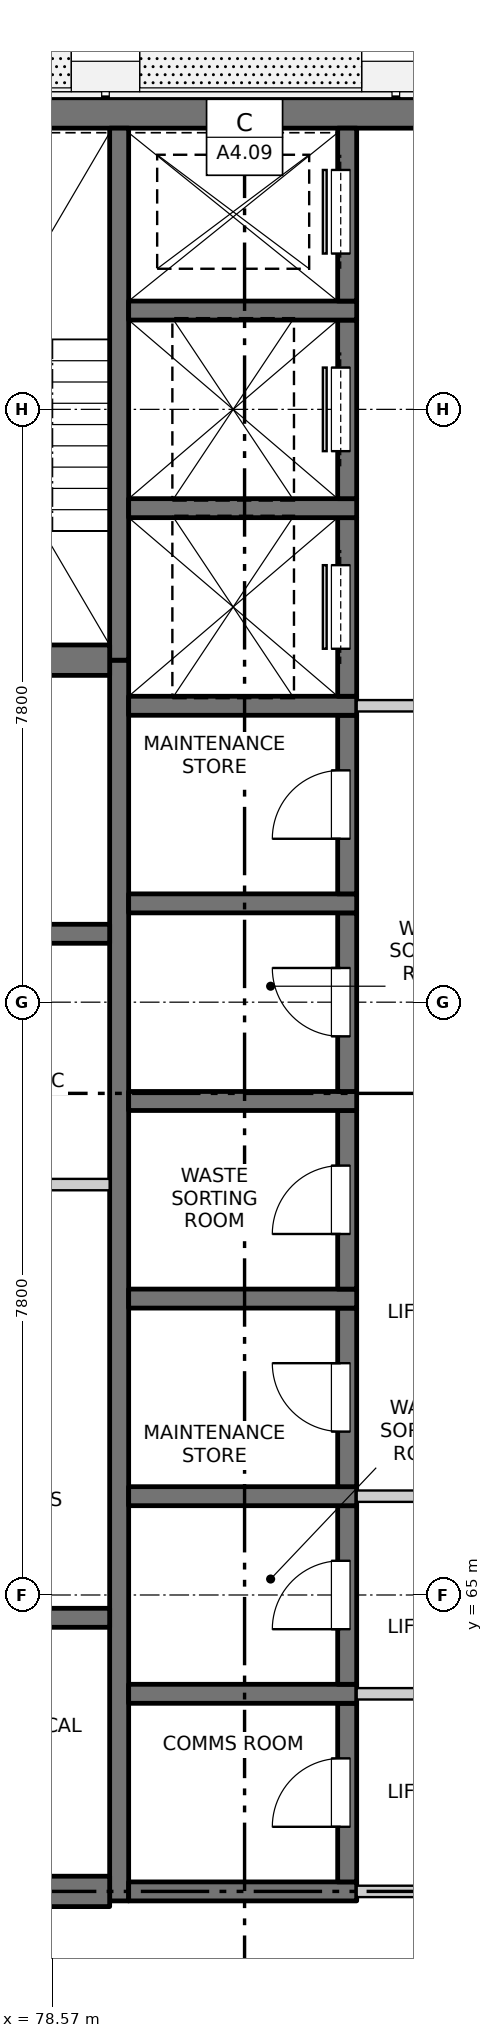
"""IFC4 building model, lengths in metres.
Left out: names, types, materials, properties, quantities, classifications, styles, units other than length and angle.
Written with IfcOpenShell. Run it as: python <this file> out.ifc"""

import sys

from ifc_helpers import new_model, si_unit, direction, frame, frame_2d, origin, place, context, subcontext, project, spatial, rectangle, extrude, element, fill, save


model = new_model("IFC4")
c1 = context("Model", 3, precision=1e-05, world=origin(), true_north=direction((0.0, 1.0)))
c2 = subcontext(c1, "Body", "Model", "MODEL_VIEW")
j1 = project(units=[si_unit("LENGTHUNIT", "METRE"), si_unit("PLANEANGLEUNIT", "RADIAN")], contexts=[c1])
p1 = place(None, origin())
s1 = spatial("IfcSite", under=j1, at=p1, CompositionType="ELEMENT")
p2 = place(p1, origin())
s2 = spatial("IfcBuilding", under=s1, at=p2, CompositionType="ELEMENT")
p3 = place(p2, frame((0.0, 0.0, 263.0)))
s3 = spatial("IfcBuildingStorey", under=s2, at=p3, CompositionType="ELEMENT", Elevation=263.0)
p4 = place(p3, frame((75.45, 84.5, -0.25), z_axis=(0.0, 0.0, 1.0), x_axis=(1.0, 0.0, 0.0)))
e1 = element("IfcWall", 1, at=p4, inside=s3, PredefinedType="SOLIDWALL", context=c2, shape_type="SweptSolid", body=[
    extrude(rectangle(XDim=19.1, YDim=0.4, at=frame_2d((9.55, 0.0))), origin(), (0.0, 0.0, 1.0), 3.35),
])
p5 = place(p3, frame((79.45, 60.975, -0.25), z_axis=(0.0, 0.0, 1.0), x_axis=(0.0, 1.0, 0.0)))
e2 = element("IfcWall", 2, at=p5, inside=s3, PredefinedType="SOLIDWALL", context=c2, shape_type="SweptSolid", body=[
    extrude(rectangle(XDim=16.325, YDim=0.25, at=frame_2d((8.163, 0.0))), origin(), (0.0, 0.0, 1.0), 3.35),
])
p6 = place(p3, frame((79.45, 77.3, -0.25), z_axis=(0.0, 0.0, 1.0), x_axis=(0.0, 1.0, 0.0)))
e3 = element("IfcWall", 3, at=p6, inside=s3, PredefinedType="SOLIDWALL", context=c2, shape_type="SweptSolid", body=[
    extrude(rectangle(XDim=7.0, YDim=0.25, at=frame_2d((3.5, 0.0))), origin(), (0.0, 0.0, 1.0), 3.35),
])
p7 = place(p3, frame((79.575, 61.1, -0.25), z_axis=(0.0, 0.0, 1.0), x_axis=(1.0, 0.0, 0.0)))
e4 = element("IfcWall", 4, at=p7, inside=s3, PredefinedType="SOLIDWALL", context=c2, shape_type="SweptSolid", body=[
    extrude(rectangle(XDim=3.0, YDim=0.25, at=frame_2d((1.5, 0.0))), origin(), (0.0, 0.0, 1.0), 3.35),
])
p8 = place(p3, frame((82.45, 61.225, -0.25), z_axis=(0.0, 0.0, 1.0), x_axis=(0.0, 1.0, 0.0)))
e5 = element("IfcWall", 5, at=p8, inside=s3, PredefinedType="SOLIDWALL", context=c2, shape_type="SweptSolid", body=[
    extrude(rectangle(XDim=2.35, YDim=0.25, at=frame_2d((1.175, 0.0))), origin(), (0.0, 0.0, 1.0), 3.35),
])
p9 = place(p8, frame((0.725, 0.0, 0.25)))
e6 = element("IfcOpeningElement", 6, at=p9, cuts=e5, PredefinedType="OPENING", context=c2, shape_type="SweptSolid", body=[
    extrude(rectangle(XDim=0.9, YDim=2.1, at=frame_2d((0.45, 1.05))), frame((0.0, 0.135, 0.0), z_axis=(0.0, -1.0, 0.0), x_axis=(1.0, 0.0, 0.0)), (0.0, 0.0, 1.0), 0.27),
])
p10 = place(p3, frame((79.575, 63.7, -0.25), z_axis=(0.0, 0.0, 1.0), x_axis=(1.0, 0.0, 0.0)))
e7 = element("IfcWall", 7, at=p10, inside=s3, PredefinedType="SOLIDWALL", context=c2, shape_type="SweptSolid", body=[
    extrude(rectangle(XDim=3.0, YDim=0.25, at=frame_2d((1.5, 0.0))), origin(), (0.0, 0.0, 1.0), 3.35),
])
p11 = place(p3, frame((82.45, 63.825, -0.25), z_axis=(0.0, 0.0, 1.0), x_axis=(0.0, 1.0, 0.0)))
e8 = element("IfcWall", 8, at=p11, inside=s3, PredefinedType="SOLIDWALL", context=c2, shape_type="SweptSolid", body=[
    extrude(rectangle(XDim=2.35, YDim=0.25, at=frame_2d((1.175, 0.0))), origin(), (0.0, 0.0, 1.0), 3.35),
])
p12 = place(p11, frame((0.725, 0.0, 0.25)))
e9 = element("IfcOpeningElement", 9, at=p12, cuts=e8, PredefinedType="OPENING", context=c2, shape_type="SweptSolid", body=[
    extrude(rectangle(XDim=0.9, YDim=2.1, at=frame_2d((0.45, 1.05))), frame((0.0, 0.135, 0.0), z_axis=(0.0, -1.0, 0.0), x_axis=(1.0, 0.0, 0.0)), (0.0, 0.0, 1.0), 0.27),
])
p13 = place(p3, frame((79.575, 66.3, -0.25), z_axis=(0.0, 0.0, 1.0), x_axis=(1.0, 0.0, 0.0)))
e10 = element("IfcWall", 10, at=p13, inside=s3, PredefinedType="SOLIDWALL", context=c2, shape_type="SweptSolid", body=[
    extrude(rectangle(XDim=3.0, YDim=0.25, at=frame_2d((1.5, 0.0))), origin(), (0.0, 0.0, 1.0), 3.35),
])
p14 = place(p3, frame((82.45, 66.425, -0.25), z_axis=(0.0, 0.0, 1.0), x_axis=(0.0, 1.0, 0.0)))
e11 = element("IfcWall", 11, at=p14, inside=s3, PredefinedType="SOLIDWALL", context=c2, shape_type="SweptSolid", body=[
    extrude(rectangle(XDim=2.35, YDim=0.25, at=frame_2d((1.175, 0.0))), origin(), (0.0, 0.0, 1.0), 3.35),
])
p15 = place(p14, frame((0.725, 0.0, 0.25)))
e12 = element("IfcOpeningElement", 12, at=p15, cuts=e11, PredefinedType="OPENING", context=c2, shape_type="SweptSolid", body=[
    extrude(rectangle(XDim=0.9, YDim=2.1, at=frame_2d((0.45, 1.05))), frame((0.0, 0.135, 0.0), z_axis=(0.0, -1.0, 0.0), x_axis=(1.0, 0.0, 0.0)), (0.0, 0.0, 1.0), 0.27),
])
p16 = place(p3, frame((79.575, 68.9, -0.25), z_axis=(0.0, 0.0, 1.0), x_axis=(1.0, 0.0, 0.0)))
e13 = element("IfcWall", 13, at=p16, inside=s3, PredefinedType="SOLIDWALL", context=c2, shape_type="SweptSolid", body=[
    extrude(rectangle(XDim=3.0, YDim=0.25, at=frame_2d((1.5, 0.0))), origin(), (0.0, 0.0, 1.0), 3.35),
])
p17 = place(p3, frame((82.45, 69.025, -0.25), z_axis=(0.0, 0.0, 1.0), x_axis=(0.0, 1.0, 0.0)))
e14 = element("IfcWall", 14, at=p17, inside=s3, PredefinedType="SOLIDWALL", context=c2, shape_type="SweptSolid", body=[
    extrude(rectangle(XDim=2.35, YDim=0.25, at=frame_2d((1.175, 0.0))), origin(), (0.0, 0.0, 1.0), 3.35),
])
p18 = place(p17, frame((0.725, 0.0, 0.25)))
e15 = element("IfcOpeningElement", 15, at=p18, cuts=e14, PredefinedType="OPENING", context=c2, shape_type="SweptSolid", body=[
    extrude(rectangle(XDim=0.9, YDim=2.1, at=frame_2d((0.45, 1.05))), frame((0.0, 0.135, 0.0), z_axis=(0.0, -1.0, 0.0), x_axis=(1.0, 0.0, 0.0)), (0.0, 0.0, 1.0), 0.27),
])
p19 = place(p3, frame((79.575, 71.5, -0.25), z_axis=(0.0, 0.0, 1.0), x_axis=(1.0, 0.0, 0.0)))
e16 = element("IfcWall", 16, at=p19, inside=s3, PredefinedType="SOLIDWALL", context=c2, shape_type="SweptSolid", body=[
    extrude(rectangle(XDim=3.0, YDim=0.25, at=frame_2d((1.5, 0.0))), origin(), (0.0, 0.0, 1.0), 3.35),
])
p20 = place(p3, frame((82.45, 71.625, -0.25), z_axis=(0.0, 0.0, 1.0), x_axis=(0.0, 1.0, 0.0)))
e17 = element("IfcWall", 17, at=p20, inside=s3, PredefinedType="SOLIDWALL", context=c2, shape_type="SweptSolid", body=[
    extrude(rectangle(XDim=2.35, YDim=0.25, at=frame_2d((1.175, 0.0))), origin(), (0.0, 0.0, 1.0), 3.35),
])
p21 = place(p20, frame((0.725, 0.0, 0.25)))
e18 = element("IfcOpeningElement", 18, at=p21, cuts=e17, PredefinedType="OPENING", context=c2, shape_type="SweptSolid", body=[
    extrude(rectangle(XDim=0.9, YDim=2.1, at=frame_2d((0.45, 1.05))), frame((0.0, 0.135, 0.0), z_axis=(0.0, -1.0, 0.0), x_axis=(1.0, 0.0, 0.0)), (0.0, 0.0, 1.0), 0.27),
])
p22 = place(p3, frame((79.575, 74.1, -0.25), z_axis=(0.0, 0.0, 1.0), x_axis=(1.0, 0.0, 0.0)))
e19 = element("IfcWall", 19, at=p22, inside=s3, PredefinedType="SOLIDWALL", context=c2, shape_type="SweptSolid", body=[
    extrude(rectangle(XDim=3.0, YDim=0.25, at=frame_2d((1.5, 0.0))), origin(), (0.0, 0.0, 1.0), 3.35),
])
p23 = place(p3, frame((82.45, 74.225, -0.25), z_axis=(0.0, 0.0, 1.0), x_axis=(0.0, 1.0, 0.0)))
e20 = element("IfcWall", 20, at=p23, inside=s3, PredefinedType="SOLIDWALL", context=c2, shape_type="SweptSolid", body=[
    extrude(rectangle(XDim=2.35, YDim=0.25, at=frame_2d((1.175, 0.0))), origin(), (0.0, 0.0, 1.0), 3.35),
])
p24 = place(p23, frame((0.725, 0.0, 0.25)))
e21 = element("IfcOpeningElement", 21, at=p24, cuts=e20, PredefinedType="OPENING", context=c2, shape_type="SweptSolid", body=[
    extrude(rectangle(XDim=0.9, YDim=2.1, at=frame_2d((0.45, 1.05))), frame((0.0, 0.135, 0.0), z_axis=(0.0, -1.0, 0.0), x_axis=(1.0, 0.0, 0.0)), (0.0, 0.0, 1.0), 0.27),
])
p25 = place(p3, frame((79.575, 76.7, -0.25), z_axis=(0.0, 0.0, 1.0), x_axis=(1.0, 0.0, 0.0)))
e22 = element("IfcWall", 22, at=p25, inside=s3, PredefinedType="SOLIDWALL", context=c2, shape_type="SweptSolid", body=[
    extrude(rectangle(XDim=3.0, YDim=0.25, at=frame_2d((1.5, 0.0))), origin(), (0.0, 0.0, 1.0), 3.35),
])
p26 = place(p3, frame((82.45, 76.825, -0.25), z_axis=(0.0, 0.0, 1.0), x_axis=(0.0, 1.0, 0.0)))
e23 = element("IfcWall", 23, at=p26, inside=s3, PredefinedType="SOLIDWALL", context=c2, shape_type="SweptSolid", body=[
    extrude(rectangle(XDim=2.35, YDim=0.25, at=frame_2d((1.175, 0.0))), origin(), (0.0, 0.0, 1.0), 3.35),
])
p27 = place(p26, frame((0.625, 0.0, 0.25)))
e24 = element("IfcOpeningElement", 24, at=p27, cuts=e23, PredefinedType="OPENING", context=c2, shape_type="SweptSolid", body=[
    extrude(rectangle(XDim=1.1, YDim=2.1, at=frame_2d((0.55, 1.05))), frame((0.0, 0.135, 0.0), z_axis=(0.0, -1.0, 0.0), x_axis=(1.0, 0.0, 0.0)), (0.0, 0.0, 1.0), 0.27),
])
p28 = place(p3, frame((79.575, 79.3, -0.25), z_axis=(0.0, 0.0, 1.0), x_axis=(1.0, 0.0, 0.0)))
e25 = element("IfcWall", 25, at=p28, inside=s3, PredefinedType="SOLIDWALL", context=c2, shape_type="SweptSolid", body=[
    extrude(rectangle(XDim=3.0, YDim=0.25, at=frame_2d((1.5, 0.0))), origin(), (0.0, 0.0, 1.0), 3.35),
])
p29 = place(p3, frame((82.45, 79.425, -0.25), z_axis=(0.0, 0.0, 1.0), x_axis=(0.0, 1.0, 0.0)))
e26 = element("IfcWall", 26, at=p29, inside=s3, PredefinedType="SOLIDWALL", context=c2, shape_type="SweptSolid", body=[
    extrude(rectangle(XDim=2.35, YDim=0.25, at=frame_2d((1.175, 0.0))), origin(), (0.0, 0.0, 1.0), 3.35),
])
p30 = place(p29, frame((0.625, 0.0, 0.25)))
e27 = element("IfcOpeningElement", 27, at=p30, cuts=e26, PredefinedType="OPENING", context=c2, shape_type="SweptSolid", body=[
    extrude(rectangle(XDim=1.1, YDim=2.1, at=frame_2d((0.55, 1.05))), frame((0.0, 0.135, 0.0), z_axis=(0.0, -1.0, 0.0), x_axis=(1.0, 0.0, 0.0)), (0.0, 0.0, 1.0), 0.27),
])
p31 = place(p3, frame((79.575, 81.9, -0.25), z_axis=(0.0, 0.0, 1.0), x_axis=(1.0, 0.0, 0.0)))
e28 = element("IfcWall", 28, at=p31, inside=s3, PredefinedType="SOLIDWALL", context=c2, shape_type="SweptSolid", body=[
    extrude(rectangle(XDim=3.0, YDim=0.25, at=frame_2d((1.5, 0.0))), origin(), (0.0, 0.0, 1.0), 3.35),
])
p32 = place(p3, frame((82.45, 82.025, -0.25), z_axis=(0.0, 0.0, 1.0), x_axis=(0.0, 1.0, 0.0)))
e29 = element("IfcWall", 29, at=p32, inside=s3, PredefinedType="SOLIDWALL", context=c2, shape_type="SweptSolid", body=[
    extrude(rectangle(XDim=2.275, YDim=0.25, at=frame_2d((1.138, 0.0))), origin(), (0.0, 0.0, 1.0), 3.35),
])
p33 = place(p32, frame((0.625, 0.0, 0.25)))
e30 = element("IfcOpeningElement", 30, at=p33, cuts=e29, PredefinedType="OPENING", context=c2, shape_type="SweptSolid", body=[
    extrude(rectangle(XDim=1.1, YDim=2.1, at=frame_2d((0.55, 1.05))), frame((0.0, 0.135, 0.0), z_axis=(0.0, -1.0, 0.0), x_axis=(1.0, 0.0, 0.0)), (0.0, 0.0, 1.0), 0.27),
])
p34 = place(p3, frame((75.45, 61.1, -0.25), z_axis=(0.0, 0.0, 1.0), x_axis=(1.0, 0.0, 0.0)))
e31 = element("IfcWall", 31, at=p34, inside=s3, PredefinedType="SOLIDWALL", context=c2, shape_type="SweptSolid", body=[
    extrude(rectangle(XDim=3.875, YDim=0.4, at=frame_2d((1.938, 0.0))), origin(), (0.0, 0.0, 1.0), 3.35),
])
for number, where, z_axis, x_axis in (
    (32, (75.45, 64.7, -0.25), (0.0, 0.0, 1.0), (1.0, 0.0, 0.0)),
    (33, (75.45, 73.7, -0.25), (0.0, 0.0, 1.0), (1.0, 0.0, 0.0)),
):
    element("IfcWall", number, at=place(p3, frame(where, z_axis=z_axis, x_axis=x_axis)), inside=s3, PredefinedType="SOLIDWALL", context=c2, shape_type="SweptSolid", body=[
        extrude(rectangle(XDim=3.875, YDim=0.25, at=frame_2d((1.938, 0.0))), origin(), (0.0, 0.0, 1.0), 3.35),
    ])
p35 = place(p3, frame((75.45, 77.3, -0.25), z_axis=(0.0, 0.0, 1.0), x_axis=(1.0, 0.0, 0.0)))
e34 = element("IfcWall", 34, at=p35, inside=s3, PredefinedType="SOLIDWALL", context=c2, shape_type="SweptSolid", body=[
    extrude(rectangle(XDim=3.875, YDim=0.4, at=frame_2d((1.938, 0.0))), origin(), (0.0, 0.0, 1.0), 3.35),
])
p36 = place(p3, frame((82.575, 61.1, 0.0), z_axis=(0.0, 0.0, 1.0), x_axis=(1.0, 0.0, 0.0)))
e35 = element("IfcWall", 35, at=p36, inside=s3, PredefinedType="PARTITIONING", context=c2, shape_type="SweptSolid", body=[
    extrude(rectangle(XDim=4.85, YDim=0.15, at=frame_2d((2.425, 0.0))), origin(), (0.0, 0.0, 1.0), 3.1),
])
p37 = place(p36, frame((1.525, 0.0, 0.0)))
e36 = element("IfcOpeningElement", 36, at=p37, cuts=e35, PredefinedType="OPENING", context=c2, shape_type="SweptSolid", body=[
    extrude(rectangle(XDim=1.8, YDim=2.1, at=frame_2d((0.9, 1.05))), frame((0.0, 0.085, 0.0), z_axis=(0.0, -1.0, 0.0), x_axis=(1.0, 0.0, 0.0)), (0.0, 0.0, 1.0), 0.17),
])
p38 = place(p3, frame((82.575, 63.7, 0.0), z_axis=(0.0, 0.0, 1.0), x_axis=(1.0, 0.0, 0.0)))
e37 = element("IfcWall", 37, at=p38, inside=s3, PredefinedType="PARTITIONING", context=c2, shape_type="SweptSolid", body=[
    extrude(rectangle(XDim=4.85, YDim=0.15, at=frame_2d((2.425, 0.0))), origin(), (0.0, 0.0, 1.0), 3.1),
])
p39 = place(p38, frame((1.525, 0.0, 0.0)))
e38 = element("IfcOpeningElement", 38, at=p39, cuts=e37, PredefinedType="OPENING", context=c2, shape_type="SweptSolid", body=[
    extrude(rectangle(XDim=1.8, YDim=2.1, at=frame_2d((0.9, 1.05))), frame((0.0, 0.085, 0.0), z_axis=(0.0, -1.0, 0.0), x_axis=(1.0, 0.0, 0.0)), (0.0, 0.0, 1.0), 0.17),
])
p40 = place(p3, frame((82.575, 66.3, 0.0), z_axis=(0.0, 0.0, 1.0), x_axis=(1.0, 0.0, 0.0)))
e39 = element("IfcWall", 39, at=p40, inside=s3, PredefinedType="PARTITIONING", context=c2, shape_type="SweptSolid", body=[
    extrude(rectangle(XDim=4.85, YDim=0.15, at=frame_2d((2.425, 0.0))), origin(), (0.0, 0.0, 1.0), 3.1),
])
p41 = place(p40, frame((1.525, 0.0, 0.0)))
e40 = element("IfcOpeningElement", 40, at=p41, cuts=e39, PredefinedType="OPENING", context=c2, shape_type="SweptSolid", body=[
    extrude(rectangle(XDim=1.8, YDim=2.1, at=frame_2d((0.9, 1.05))), frame((0.0, 0.085, 0.0), z_axis=(0.0, -1.0, 0.0), x_axis=(1.0, 0.0, 0.0)), (0.0, 0.0, 1.0), 0.17),
])
p42 = place(p3, frame((75.45, 70.4, 0.0), z_axis=(0.0, 0.0, 1.0), x_axis=(1.0, 0.0, 0.0)))
e41 = element("IfcWall", 41, at=p42, inside=s3, PredefinedType="PARTITIONING", context=c2, shape_type="SweptSolid", body=[
    extrude(rectangle(XDim=3.875, YDim=0.15, at=frame_2d((1.938, 0.0))), origin(), (0.0, 0.0, 1.0), 3.1),
])
p43 = place(p3, frame((82.575, 76.7, 0.0), z_axis=(0.0, 0.0, 1.0), x_axis=(1.0, 0.0, 0.0)))
e42 = element("IfcWall", 42, at=p43, inside=s3, PredefinedType="PARTITIONING", context=c2, shape_type="SweptSolid", body=[
    extrude(rectangle(XDim=4.85, YDim=0.15, at=frame_2d((2.425, 0.0))), origin(), (0.0, 0.0, 1.0), 3.1),
])
p44 = place(p43, frame((1.525, 0.0, 0.0)))
e43 = element("IfcOpeningElement", 43, at=p44, cuts=e42, PredefinedType="OPENING", context=c2, shape_type="SweptSolid", body=[
    extrude(rectangle(XDim=1.8, YDim=2.1, at=frame_2d((0.9, 1.05))), frame((0.0, 0.085, 0.0), z_axis=(0.0, -1.0, 0.0), x_axis=(1.0, 0.0, 0.0)), (0.0, 0.0, 1.0), 0.17),
])
p45 = place(p9, origin())
e44 = element("IfcDoor", 44, at=p45, inside=s3, OperationType="SINGLE_SWING_LEFT", PredefinedType="DOOR", context=c2, shape_type="SweptSolid", body=[
    extrude(rectangle(XDim=0.9, YDim=2.1, at=frame_2d((0.45, 1.05))), frame((0.0, 0.11, 0.0), z_axis=(0.0, -1.0, 0.0), x_axis=(1.0, 0.0, 0.0)), (0.0, 0.0, 1.0), 0.05),
])
fill(e6, e44)
p46 = place(p12, origin())
e45 = element("IfcDoor", 45, at=p46, inside=s3, OperationType="SINGLE_SWING_LEFT", PredefinedType="DOOR", context=c2, shape_type="SweptSolid", body=[
    extrude(rectangle(XDim=0.9, YDim=2.1, at=frame_2d((0.45, 1.05))), frame((0.0, 0.11, 0.0), z_axis=(0.0, -1.0, 0.0), x_axis=(1.0, 0.0, 0.0)), (0.0, 0.0, 1.0), 0.05),
])
fill(e9, e45)
p47 = place(p15, origin())
e46 = element("IfcDoor", 46, at=p47, inside=s3, OperationType="SINGLE_SWING_RIGHT", PredefinedType="DOOR", context=c2, shape_type="SweptSolid", body=[
    extrude(rectangle(XDim=0.9, YDim=2.1, at=frame_2d((0.45, 1.05))), frame((0.0, 0.11, 0.0), z_axis=(0.0, -1.0, 0.0), x_axis=(1.0, 0.0, 0.0)), (0.0, 0.0, 1.0), 0.05),
])
fill(e12, e46)
p48 = place(p18, origin())
e47 = element("IfcDoor", 47, at=p48, inside=s3, OperationType="SINGLE_SWING_LEFT", PredefinedType="DOOR", context=c2, shape_type="SweptSolid", body=[
    extrude(rectangle(XDim=0.9, YDim=2.1, at=frame_2d((0.45, 1.05))), frame((0.0, 0.11, 0.0), z_axis=(0.0, -1.0, 0.0), x_axis=(1.0, 0.0, 0.0)), (0.0, 0.0, 1.0), 0.05),
])
fill(e15, e47)
p49 = place(p21, origin())
e48 = element("IfcDoor", 48, at=p49, inside=s3, OperationType="SINGLE_SWING_RIGHT", PredefinedType="DOOR", context=c2, shape_type="SweptSolid", body=[
    extrude(rectangle(XDim=0.9, YDim=2.1, at=frame_2d((0.45, 1.05))), frame((0.0, 0.11, 0.0), z_axis=(0.0, -1.0, 0.0), x_axis=(1.0, 0.0, 0.0)), (0.0, 0.0, 1.0), 0.05),
])
fill(e18, e48)
p50 = place(p24, origin())
e49 = element("IfcDoor", 49, at=p50, inside=s3, OperationType="SINGLE_SWING_LEFT", PredefinedType="DOOR", context=c2, shape_type="SweptSolid", body=[
    extrude(rectangle(XDim=0.9, YDim=2.1, at=frame_2d((0.45, 1.05))), frame((0.0, 0.11, 0.0), z_axis=(0.0, -1.0, 0.0), x_axis=(1.0, 0.0, 0.0)), (0.0, 0.0, 1.0), 0.05),
])
fill(e21, e49)
p51 = place(p27, origin())
e50 = element("IfcDoor", 50, at=p51, inside=s3, OperationType="SLIDING_TO_LEFT", PredefinedType="DOOR", context=c2, shape_type="SweptSolid", body=[
    extrude(rectangle(XDim=1.1, YDim=2.1, at=frame_2d((0.55, 1.05))), frame((0.0, 0.11, 0.0), z_axis=(0.0, -1.0, 0.0), x_axis=(1.0, 0.0, 0.0)), (0.0, 0.0, 1.0), 0.05),
])
fill(e24, e50)
p52 = place(p30, origin())
e51 = element("IfcDoor", 51, at=p52, inside=s3, OperationType="SLIDING_TO_LEFT", PredefinedType="DOOR", context=c2, shape_type="SweptSolid", body=[
    extrude(rectangle(XDim=1.1, YDim=2.1, at=frame_2d((0.55, 1.05))), frame((0.0, 0.11, 0.0), z_axis=(0.0, -1.0, 0.0), x_axis=(1.0, 0.0, 0.0)), (0.0, 0.0, 1.0), 0.05),
])
fill(e27, e51)
p53 = place(p33, origin())
e52 = element("IfcDoor", 52, at=p53, inside=s3, OperationType="SLIDING_TO_RIGHT", PredefinedType="DOOR", context=c2, shape_type="SweptSolid", body=[
    extrude(rectangle(XDim=1.1, YDim=2.1, at=frame_2d((0.55, 1.05))), frame((0.0, 0.11, 0.0), z_axis=(0.0, -1.0, 0.0), x_axis=(1.0, 0.0, 0.0)), (0.0, 0.0, 1.0), 0.05),
])
fill(e30, e52)
save(model, sys.argv[1])
